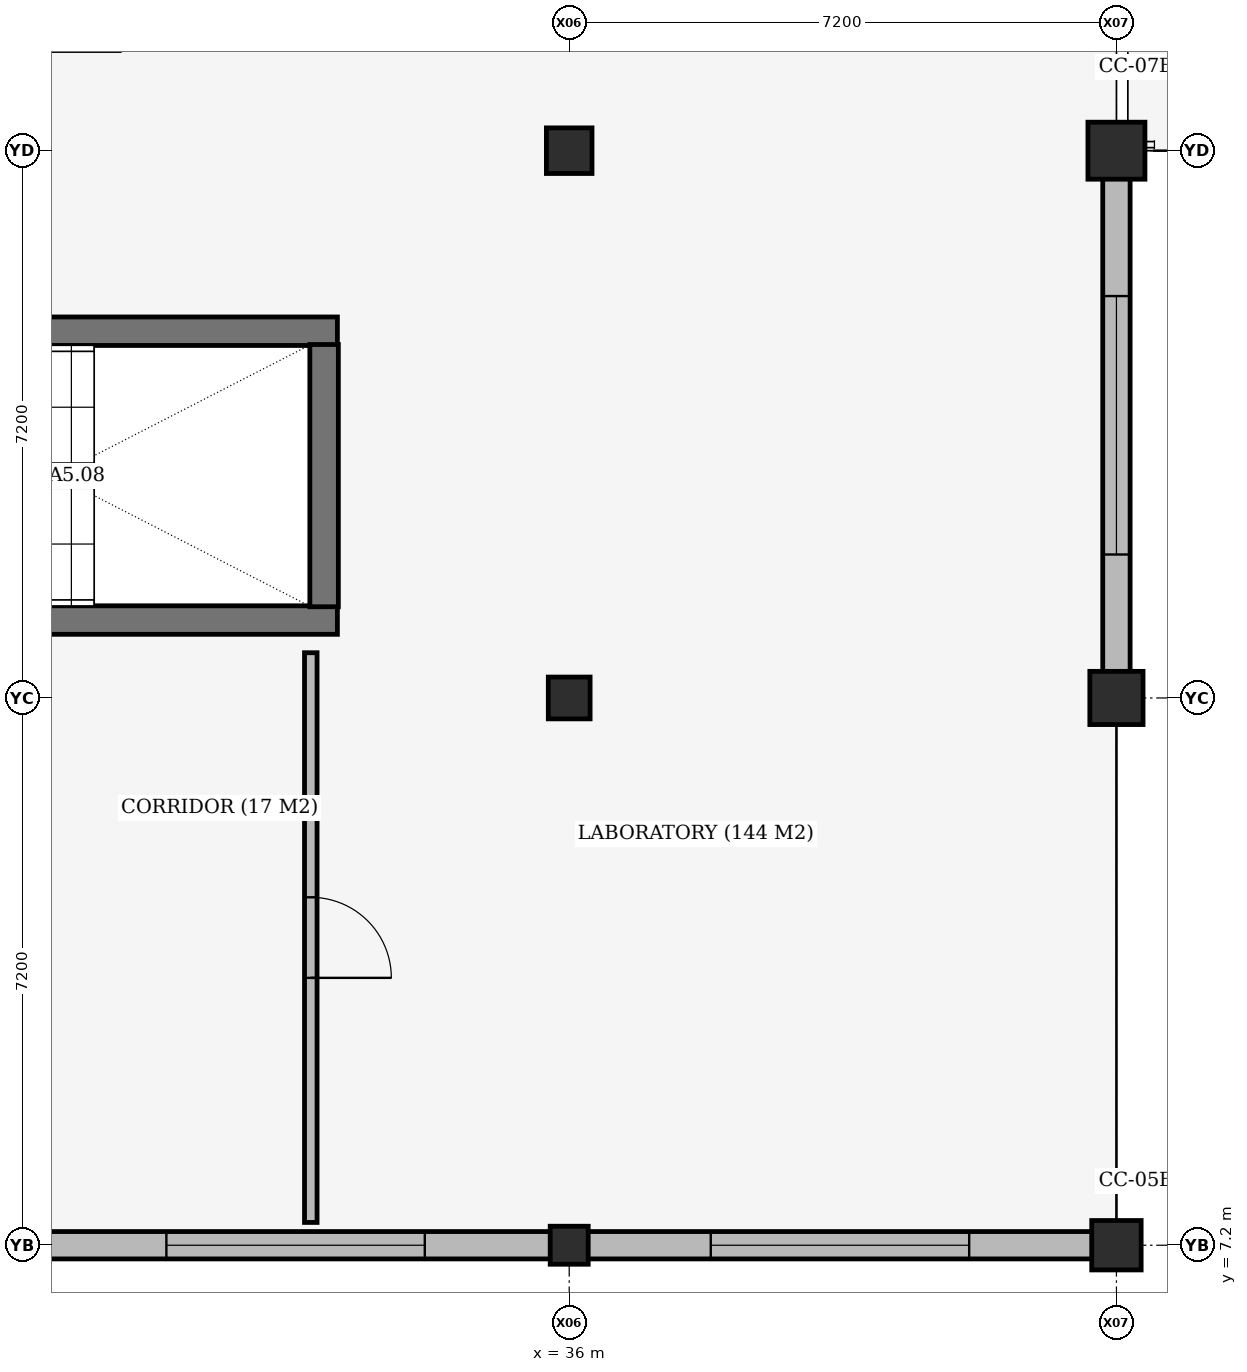
"""IFC4 building model, lengths in metres.
Left out: names, types, materials, properties, quantities, classifications, styles, units other than length and angle.
Written with IfcOpenShell. Run it as: python <this file> out.ifc"""

import sys

from ifc_helpers import new_model, si_unit, direction, frame, frame_2d, origin, origin_2d, place, context, subcontext, project, spatial, rectangle, extrude, element, fill, save


model = new_model("IFC4")
c1 = context("Model", 3, precision=1e-05, world=origin(), true_north=direction((0.0, 1.0)))
c2 = subcontext(c1, "Body", "Model", "MODEL_VIEW")
j1 = project(units=[si_unit("LENGTHUNIT", "METRE"), si_unit("PLANEANGLEUNIT", "RADIAN")], contexts=[c1])
p1 = place(None, origin())
s1 = spatial("IfcSite", under=j1, at=p1, CompositionType="ELEMENT")
p2 = place(p1, origin())
s2 = spatial("IfcBuilding", under=s1, at=p2, CompositionType="ELEMENT")
p3 = place(p2, frame((0.0, 0.0, 5.4)))
s3 = spatial("IfcBuildingStorey", under=s2, at=p3, CompositionType="ELEMENT", Elevation=5.4)
p4 = place(p3, frame((36.0, 7.2, 0.0), z_axis=(0.0, 0.0, 1.0), x_axis=(1.0, 0.0, 0.0)))
e1 = element("IfcColumn", 1, at=p4, inside=s3, PredefinedType="COLUMN", context=c2, shape_type="SweptSolid", body=[
    extrude(rectangle(XDim=0.5, YDim=0.5, at=origin_2d()), origin(), (0.0, 0.0, 1.0), 3.89),
])
p5 = place(p3, frame((36.0, 14.4, 0.0), z_axis=(0.0, 0.0, 1.0), x_axis=(1.0, 0.0, 0.0)))
e2 = element("IfcColumn", 2, at=p5, inside=s3, PredefinedType="COLUMN", context=c2, shape_type="SweptSolid", body=[
    extrude(rectangle(XDim=0.55, YDim=0.55, at=origin_2d()), origin(), (0.0, 0.0, 1.0), 3.89),
])
p6 = place(p3, frame((36.0, 21.6, 0.0), z_axis=(0.0, 0.0, 1.0), x_axis=(1.0, 0.0, 0.0)))
e3 = element("IfcColumn", 3, at=p6, inside=s3, PredefinedType="COLUMN", context=c2, shape_type="SweptSolid", body=[
    extrude(rectangle(XDim=0.6, YDim=0.6, at=origin_2d()), origin(), (0.0, 0.0, 1.0), 3.89),
])
p7 = place(p3, frame((43.2, 7.2, 0.0), z_axis=(0.0, 0.0, 1.0), x_axis=(1.0, 0.0, 0.0)))
e4 = element("IfcColumn", 4, at=p7, inside=s3, PredefinedType="COLUMN", context=c2, shape_type="SweptSolid", body=[
    extrude(rectangle(XDim=0.65, YDim=0.65, at=origin_2d()), origin(), (0.0, 0.0, 1.0), 3.89),
])
p8 = place(p3, frame((43.2, 14.4, 0.0), z_axis=(0.0, 0.0, 1.0), x_axis=(1.0, 0.0, 0.0)))
e5 = element("IfcColumn", 5, at=p8, inside=s3, PredefinedType="COLUMN", context=c2, shape_type="SweptSolid", body=[
    extrude(rectangle(XDim=0.7, YDim=0.7, at=origin_2d()), origin(), (0.0, 0.0, 1.0), 3.89),
])
p9 = place(p3, frame((43.2, 21.6, 0.0), z_axis=(0.0, 0.0, 1.0), x_axis=(1.0, 0.0, 0.0)))
e6 = element("IfcColumn", 6, at=p9, inside=s3, PredefinedType="COLUMN", context=c2, shape_type="SweptSolid", body=[
    extrude(rectangle(XDim=0.75, YDim=0.75, at=origin_2d()), origin(), (0.0, 0.0, 1.0), 3.89),
])
for number, where, z_axis, x_axis in (
    (7, (23.85, 15.425, 0.0), (0.0, 0.0, 1.0), (1.0, 0.0, 0.0)),
    (8, (32.95, 19.225, 0.0), (0.0, 0.0, 1.0), (-1.0, 0.0, 0.0)),
):
    element("IfcWall", number, at=place(p3, frame(where, z_axis=z_axis, x_axis=x_axis)), inside=s3, PredefinedType="SHEAR", context=c2, shape_type="SweptSolid", body=[
        extrude(rectangle(XDim=9.1, YDim=0.375, at=frame_2d((4.55, 0.0))), origin(), (0.0, 0.0, 1.0), 3.89),
    ])
p10 = place(p3, frame((32.775, 15.6, 0.0), z_axis=(0.0, 0.0, 1.0), x_axis=(0.0, 1.0, 0.0)))
e9 = element("IfcWall", 9, at=p10, inside=s3, PredefinedType="SHEAR", context=c2, shape_type="SweptSolid", body=[
    extrude(rectangle(XDim=3.45, YDim=0.375, at=frame_2d((1.725, 0.0))), origin(), (0.0, 0.0, 1.0), 3.89),
])
p11 = place(p3, frame((35.758, 7.2, 0.0), z_axis=(0.0, 0.0, 1.0), x_axis=(-1.0, 0.0, 0.0)))
e10 = element("IfcWall", 10, at=p11, inside=s3, PredefinedType="STANDARD", context=c2, shape_type="SweptSolid", body=[
    extrude(rectangle(XDim=6.716, YDim=0.36, at=frame_2d((3.358, 0.0))), origin(), (0.0, 0.0, 1.0), 3.21),
])
p12 = place(p11, frame((1.658, 0.0, 0.9)))
e11 = element("IfcOpeningElement", 11, at=p12, cuts=e10, PredefinedType="OPENING", context=c2, shape_type="SweptSolid", body=[
    extrude(rectangle(XDim=3.4, YDim=1.5, at=frame_2d((1.7, 0.75))), frame((0.0, 0.19, 0.0), z_axis=(0.0, -1.0, 0.0), x_axis=(1.0, 0.0, 0.0)), (0.0, 0.0, 1.0), 0.38),
])
p13 = place(p3, frame((42.883, 7.2, 0.0), z_axis=(0.0, 0.0, 1.0), x_axis=(-1.0, 0.0, 0.0)))
e12 = element("IfcWall", 12, at=p13, inside=s3, PredefinedType="STANDARD", context=c2, shape_type="SweptSolid", body=[
    extrude(rectangle(XDim=6.641, YDim=0.36, at=frame_2d((3.321, 0.0))), origin(), (0.0, 0.0, 1.0), 3.15),
])
p14 = place(p13, frame((1.621, 0.0, 0.9)))
e13 = element("IfcOpeningElement", 13, at=p14, cuts=e12, PredefinedType="OPENING", context=c2, shape_type="SweptSolid", body=[
    extrude(rectangle(XDim=3.4, YDim=1.5, at=frame_2d((1.7, 0.75))), frame((0.0, 0.19, 0.0), z_axis=(0.0, -1.0, 0.0), x_axis=(1.0, 0.0, 0.0)), (0.0, 0.0, 1.0), 0.38),
])
p15 = place(p3, frame((43.2, 21.233, 0.0), z_axis=(0.0, 0.0, 1.0), x_axis=(0.0, -1.0, 0.0)))
e14 = element("IfcWall", 14, at=p15, inside=s3, PredefinedType="STANDARD", context=c2, shape_type="SweptSolid", body=[
    extrude(rectangle(XDim=6.491, YDim=0.36, at=frame_2d((3.246, 0.0))), origin(), (0.0, 0.0, 1.0), 3.21),
])
p16 = place(p15, frame((1.545, 0.0, 0.9)))
e15 = element("IfcOpeningElement", 15, at=p16, cuts=e14, PredefinedType="OPENING", context=c2, shape_type="SweptSolid", body=[
    extrude(rectangle(XDim=3.4, YDim=1.5, at=frame_2d((1.7, 0.75))), frame((0.0, 0.19, 0.0), z_axis=(0.0, -1.0, 0.0), x_axis=(1.0, 0.0, 0.0)), (0.0, 0.0, 1.0), 0.38),
])
p17 = place(p3, frame((32.6, 7.5, 0.0), z_axis=(0.0, 0.0, 1.0), x_axis=(0.0, 1.0, 0.0)))
e16 = element("IfcWall", 16, at=p17, inside=s3, PredefinedType="PARTITIONING", context=c2, shape_type="SweptSolid", body=[
    extrude(rectangle(XDim=7.495, YDim=0.165, at=frame_2d((3.748, 0.0))), origin(), (0.0, 0.0, 1.0), 3.15),
])
p18 = place(p17, frame((3.218, 0.0, 0.0)))
e17 = element("IfcOpeningElement", 17, at=p18, cuts=e16, PredefinedType="OPENING", context=c2, shape_type="SweptSolid", body=[
    extrude(rectangle(XDim=1.06, YDim=2.2, at=frame_2d((0.53, 1.1))), frame((0.0, 0.093, 0.0), z_axis=(0.0, -1.0, 0.0), x_axis=(1.0, 0.0, 0.0)), (0.0, 0.0, 1.0), 0.185),
])
p19 = place(p12, origin())
e18 = element("IfcWindow", 18, at=p19, inside=s3, PartitioningType="DOUBLE_PANEL_VERTICAL", PredefinedType="WINDOW", context=c2, shape_type="SweptSolid", body=[
    extrude(rectangle(XDim=3.4, YDim=1.5, at=frame_2d((1.7, 0.75))), frame((0.0, 0.03, 0.0), z_axis=(0.0, -1.0, 0.0), x_axis=(1.0, 0.0, 0.0)), (0.0, 0.0, 1.0), 0.06),
])
fill(e11, e18)
p20 = place(p14, origin())
e19 = element("IfcWindow", 19, at=p20, inside=s3, PartitioningType="DOUBLE_PANEL_VERTICAL", PredefinedType="WINDOW", context=c2, shape_type="SweptSolid", body=[
    extrude(rectangle(XDim=3.4, YDim=1.5, at=frame_2d((1.7, 0.75))), frame((0.0, 0.03, 0.0), z_axis=(0.0, -1.0, 0.0), x_axis=(1.0, 0.0, 0.0)), (0.0, 0.0, 1.0), 0.06),
])
fill(e13, e19)
p21 = place(p16, origin())
e20 = element("IfcWindow", 20, at=p21, inside=s3, PartitioningType="DOUBLE_PANEL_VERTICAL", PredefinedType="WINDOW", context=c2, shape_type="SweptSolid", body=[
    extrude(rectangle(XDim=3.4, YDim=1.5, at=frame_2d((1.7, 0.75))), frame((0.0, 0.03, 0.0), z_axis=(0.0, -1.0, 0.0), x_axis=(1.0, 0.0, 0.0)), (0.0, 0.0, 1.0), 0.06),
])
fill(e15, e20)
p22 = place(p18, origin())
e21 = element("IfcDoor", 21, at=p22, inside=s3, OperationType="SINGLE_SWING_RIGHT", PredefinedType="DOOR", context=c2, shape_type="SweptSolid", body=[
    extrude(rectangle(XDim=1.06, YDim=2.2, at=frame_2d((0.53, 1.1))), frame((0.0, 0.025, 0.0), z_axis=(0.0, -1.0, 0.0), x_axis=(1.0, 0.0, 0.0)), (0.0, 0.0, 1.0), 0.05),
])
fill(e17, e21)
save(model, sys.argv[1])
